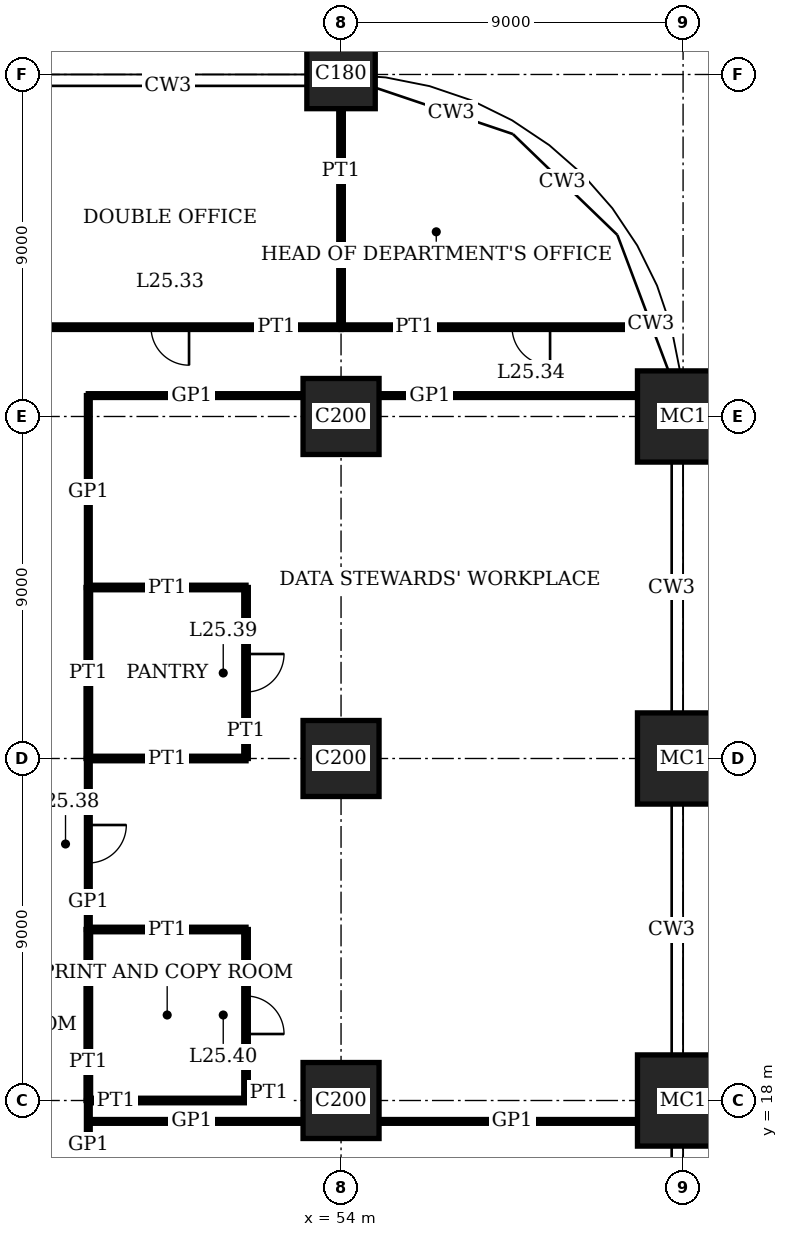
"""IFC4 building model, lengths in metres.
Left out: names, types, materials, properties, quantities, classifications, styles, units other than length and angle.
Written with IfcOpenShell. Run it as: python <this file> out.ifc"""

import sys

from ifc_helpers import new_model, si_unit, direction, frame, frame_2d, origin, origin_2d, place, context, subcontext, project, spatial, rectangle, extrude, element, fill, save


model = new_model("IFC4")
c1 = context("Model", 3, precision=1e-05, world=origin(), true_north=direction((0.0, 1.0)))
c2 = subcontext(c1, "Body", "Model", "MODEL_VIEW")
j1 = project(units=[si_unit("LENGTHUNIT", "METRE"), si_unit("PLANEANGLEUNIT", "RADIAN")], contexts=[c1])
p1 = place(None, origin())
s1 = spatial("IfcSite", under=j1, at=p1, CompositionType="ELEMENT")
p2 = place(p1, origin())
s2 = spatial("IfcBuilding", under=s1, at=p2, CompositionType="ELEMENT")
p3 = place(p2, frame((0.0, 0.0, 105.0)))
s3 = spatial("IfcBuildingStorey", under=s2, at=p3, CompositionType="ELEMENT", Elevation=105.0)
for number, where, z_axis, x_axis in (
    (1, (54.0, 18.0, 0.0), (0.0, 0.0, 1.0), (1.0, 0.0, 0.0)),
    (2, (54.0, 27.0, 0.0), (0.0, 0.0, 1.0), (1.0, 0.0, 0.0)),
    (3, (54.0, 36.0, 0.0), (0.0, 0.0, 1.0), (1.0, 0.0, 0.0)),
):
    element("IfcColumn", number, at=place(p3, frame(where, z_axis=z_axis, x_axis=x_axis)), inside=s3, PredefinedType="COLUMN", context=c2, shape_type="SweptSolid", body=[
        extrude(rectangle(XDim=2.0, YDim=2.0, at=origin_2d()), origin(), (0.0, 0.0, 1.0), 4.0),
    ])
p4 = place(p3, frame((54.0, 45.0, 0.0), z_axis=(0.0, 0.0, 1.0), x_axis=(1.0, 0.0, 0.0)))
e4 = element("IfcColumn", 4, at=p4, inside=s3, PredefinedType="COLUMN", context=c2, shape_type="SweptSolid", body=[
    extrude(rectangle(XDim=1.8, YDim=1.8, at=origin_2d()), origin(), (0.0, 0.0, 1.0), 4.0),
])
for number, where, z_axis, x_axis in (
    (5, (63.0, 18.0, 0.0), (0.0, 0.0, 1.0), (1.0, 0.0, 0.0)),
    (6, (63.0, 27.0, 0.0), (0.0, 0.0, 1.0), (1.0, 0.0, 0.0)),
    (7, (63.0, 36.0, 0.0), (0.0, 0.0, 1.0), (1.0, 0.0, 0.0)),
):
    element("IfcColumn", number, at=place(p3, frame(where, z_axis=z_axis, x_axis=x_axis)), inside=s3, PredefinedType="COLUMN", context=c2, shape_type="SweptSolid", body=[
        extrude(rectangle(XDim=2.4, YDim=2.4, at=origin_2d()), origin(), (0.0, 0.0, 1.0), 4.0),
    ])
p5 = place(p3, frame((47.35, 17.45, 0.0), z_axis=(0.0, 0.0, 1.0), x_axis=(1.0, 0.0, 0.0)))
e8 = element("IfcWall", 8, at=p5, inside=s3, PredefinedType="PARTITIONING", context=c2, shape_type="SweptSolid", body=[
    extrude(rectangle(XDim=5.65, YDim=0.1, at=frame_2d((2.825, 0.0))), origin(), (0.0, 0.0, 1.0), 3.75),
])
p6 = place(p3, frame((55.0, 17.45, 0.0), z_axis=(0.0, 0.0, 1.0), x_axis=(1.0, 0.0, 0.0)))
e9 = element("IfcWall", 9, at=p6, inside=s3, PredefinedType="PARTITIONING", context=c2, shape_type="SweptSolid", body=[
    extrude(rectangle(XDim=6.8, YDim=0.1, at=frame_2d((3.4, 0.0))), origin(), (0.0, 0.0, 1.0), 3.75),
])
p7 = place(p3, frame((47.35, 18.0, 0.0), z_axis=(0.0, 0.0, 1.0), x_axis=(1.0, 0.0, 0.0)))
e10 = element("IfcWall", 10, at=p7, inside=s3, PredefinedType="PARTITIONING", context=c2, shape_type="SweptSolid", body=[
    extrude(rectangle(XDim=4.15, YDim=0.12, at=frame_2d((2.075, 0.0))), origin(), (0.0, 0.0, 1.0), 3.05),
])
p8 = place(p3, frame((47.35, 22.5, 0.0), z_axis=(0.0, 0.0, 1.0), x_axis=(1.0, 0.0, 0.0)))
e11 = element("IfcWall", 11, at=p8, inside=s3, PredefinedType="PARTITIONING", context=c2, shape_type="SweptSolid", body=[
    extrude(rectangle(XDim=4.15, YDim=0.12, at=frame_2d((2.075, 0.0))), origin(), (0.0, 0.0, 1.0), 3.1),
])
p9 = place(p3, frame((47.35, 27.0, 0.0), z_axis=(0.0, 0.0, 1.0), x_axis=(1.0, 0.0, 0.0)))
e12 = element("IfcWall", 12, at=p9, inside=s3, PredefinedType="PARTITIONING", context=c2, shape_type="SweptSolid", body=[
    extrude(rectangle(XDim=4.15, YDim=0.12, at=frame_2d((2.075, 0.0))), origin(), (0.0, 0.0, 1.0), 3.05),
])
p10 = place(p3, frame((47.35, 31.5, 0.0), z_axis=(0.0, 0.0, 1.0), x_axis=(1.0, 0.0, 0.0)))
e13 = element("IfcWall", 13, at=p10, inside=s3, PredefinedType="PARTITIONING", context=c2, shape_type="SweptSolid", body=[
    extrude(rectangle(XDim=4.15, YDim=0.12, at=frame_2d((2.075, 0.0))), origin(), (0.0, 0.0, 1.0), 3.1),
])
p11 = place(p3, frame((47.35, 36.55, 0.0), z_axis=(0.0, 0.0, 1.0), x_axis=(1.0, 0.0, 0.0)))
e14 = element("IfcWall", 14, at=p11, inside=s3, PredefinedType="PARTITIONING", context=c2, shape_type="SweptSolid", body=[
    extrude(rectangle(XDim=5.65, YDim=0.1, at=frame_2d((2.825, 0.0))), origin(), (0.0, 0.0, 1.0), 3.75),
])
p12 = place(p3, frame((55.0, 36.55, 0.0), z_axis=(0.0, 0.0, 1.0), x_axis=(1.0, 0.0, 0.0)))
e15 = element("IfcWall", 15, at=p12, inside=s3, PredefinedType="PARTITIONING", context=c2, shape_type="SweptSolid", body=[
    extrude(rectangle(XDim=6.8, YDim=0.1, at=frame_2d((3.4, 0.0))), origin(), (0.0, 0.0, 1.0), 3.75),
])
p13 = place(p3, frame((45.0, 38.35, 0.0), z_axis=(0.0, 0.0, 1.0), x_axis=(1.0, 0.0, 0.0)))
e16 = element("IfcWall", 16, at=p13, inside=s3, PredefinedType="PARTITIONING", context=c2, shape_type="SweptSolid", body=[
    extrude(rectangle(XDim=9.0, YDim=0.12, at=frame_2d((4.5, 0.0))), origin(), (0.0, 0.0, 1.0), 3.75),
])
p14 = place(p13, frame((4.0, 0.0, 0.0)))
e17 = element("IfcOpeningElement", 17, at=p14, cuts=e16, PredefinedType="OPENING", context=c2, shape_type="SweptSolid", body=[
    extrude(rectangle(XDim=1.0, YDim=2.4, at=frame_2d((0.5, 1.2))), frame((0.0, 0.07, 0.0), z_axis=(0.0, -1.0, 0.0), x_axis=(1.0, 0.0, 0.0)), (0.0, 0.0, 1.0), 0.14),
])
p15 = place(p3, frame((54.0, 38.35, 0.0), z_axis=(0.0, 0.0, 1.0), x_axis=(1.0, 0.0, 0.0)))
e18 = element("IfcWall", 18, at=p15, inside=s3, PredefinedType="PARTITIONING", context=c2, shape_type="SweptSolid", body=[
    extrude(rectangle(XDim=8.145, YDim=0.12, at=frame_2d((4.072, 0.0))), origin(), (0.0, 0.0, 1.0), 3.75),
])
p16 = place(p15, frame((4.5, 0.0, 0.0)))
e19 = element("IfcOpeningElement", 19, at=p16, cuts=e18, PredefinedType="OPENING", context=c2, shape_type="SweptSolid", body=[
    extrude(rectangle(XDim=1.0, YDim=2.4, at=frame_2d((0.5, 1.2))), frame((0.0, 0.07, 0.0), z_axis=(0.0, -1.0, 0.0), x_axis=(1.0, 0.0, 0.0)), (0.0, 0.0, 1.0), 0.14),
])
for number, where, z_axis, x_axis in (
    (20, (47.35, 27.0, 0.0), (0.0, 0.0, 1.0), (0.0, 1.0, 0.0)),
    (21, (47.35, 18.0, 0.0), (0.0, 0.0, 1.0), (0.0, 1.0, 0.0)),
):
    element("IfcWall", number, at=place(p3, frame(where, z_axis=z_axis, x_axis=x_axis)), inside=s3, PredefinedType="PARTITIONING", context=c2, shape_type="SweptSolid", body=[
        extrude(rectangle(XDim=4.5, YDim=0.12, at=frame_2d((2.25, 0.0))), origin(), (0.0, 0.0, 1.0), 3.75),
    ])
p17 = place(p3, frame((47.35, 15.65, 0.0), z_axis=(0.0, 0.0, 1.0), x_axis=(0.0, 1.0, 0.0)))
e22 = element("IfcWall", 22, at=p17, inside=s3, PredefinedType="PARTITIONING", context=c2, shape_type="SweptSolid", body=[
    extrude(rectangle(XDim=2.35, YDim=0.1, at=frame_2d((1.175, 0.0))), origin(), (0.0, 0.0, 1.0), 3.75),
])
p18 = place(p3, frame((47.35, 22.5, 0.0), z_axis=(0.0, 0.0, 1.0), x_axis=(0.0, 1.0, 0.0)))
e23 = element("IfcWall", 23, at=p18, inside=s3, PredefinedType="PARTITIONING", context=c2, shape_type="SweptSolid", body=[
    extrude(rectangle(XDim=4.5, YDim=0.1, at=frame_2d((2.25, 0.0))), origin(), (0.0, 0.0, 1.0), 3.75),
])
p19 = place(p18, frame((1.75, 0.0, 0.0)))
e24 = element("IfcOpeningElement", 24, at=p19, cuts=e23, PredefinedType="OPENING", context=c2, shape_type="SweptSolid", body=[
    extrude(rectangle(XDim=1.0, YDim=2.4, at=frame_2d((0.5, 1.2))), frame((0.0, 0.06, 0.0), z_axis=(0.0, -1.0, 0.0), x_axis=(1.0, 0.0, 0.0)), (0.0, 0.0, 1.0), 0.12),
])
p20 = place(p3, frame((47.35, 31.5, 0.0), z_axis=(0.0, 0.0, 1.0), x_axis=(0.0, 1.0, 0.0)))
e25 = element("IfcWall", 25, at=p20, inside=s3, PredefinedType="PARTITIONING", context=c2, shape_type="SweptSolid", body=[
    extrude(rectangle(XDim=5.05, YDim=0.1, at=frame_2d((2.525, 0.0))), origin(), (0.0, 0.0, 1.0), 3.75),
])
p21 = place(p3, frame((51.5, 27.0, 0.0), z_axis=(0.0, 0.0, 1.0), x_axis=(0.0, 1.0, 0.0)))
e26 = element("IfcWall", 26, at=p21, inside=s3, PredefinedType="PARTITIONING", context=c2, shape_type="SweptSolid", body=[
    extrude(rectangle(XDim=4.5, YDim=0.12, at=frame_2d((2.25, 0.0))), origin(), (0.0, 0.0, 1.0), 3.75),
])
p22 = place(p21, frame((1.75, 0.0, 0.0)))
e27 = element("IfcOpeningElement", 27, at=p22, cuts=e26, PredefinedType="OPENING", context=c2, shape_type="SweptSolid", body=[
    extrude(rectangle(XDim=1.0, YDim=2.4, at=frame_2d((0.5, 1.2))), frame((0.0, 0.07, 0.0), z_axis=(0.0, -1.0, 0.0), x_axis=(1.0, 0.0, 0.0)), (0.0, 0.0, 1.0), 0.14),
])
p23 = place(p3, frame((51.5, 18.0, 0.0), z_axis=(0.0, 0.0, 1.0), x_axis=(0.0, 1.0, 0.0)))
e28 = element("IfcWall", 28, at=p23, inside=s3, PredefinedType="PARTITIONING", context=c2, shape_type="SweptSolid", body=[
    extrude(rectangle(XDim=4.5, YDim=0.12, at=frame_2d((2.25, 0.0))), origin(), (0.0, 0.0, 1.0), 3.75),
])
p24 = place(p23, frame((1.75, 0.0, 0.0)))
e29 = element("IfcOpeningElement", 29, at=p24, cuts=e28, PredefinedType="OPENING", context=c2, shape_type="SweptSolid", body=[
    extrude(rectangle(XDim=1.0, YDim=2.4, at=frame_2d((0.5, 1.2))), frame((0.0, 0.07, 0.0), z_axis=(0.0, -1.0, 0.0), x_axis=(1.0, 0.0, 0.0)), (0.0, 0.0, 1.0), 0.14),
])
p25 = place(p3, frame((54.0, 38.35, 0.0), z_axis=(0.0, 0.0, 1.0), x_axis=(0.0, 1.0, 0.0)))
e30 = element("IfcWall", 30, at=p25, inside=s3, PredefinedType="PARTITIONING", context=c2, shape_type="SweptSolid", body=[
    extrude(rectangle(XDim=5.75, YDim=0.12, at=frame_2d((2.875, 0.0))), origin(), (0.0, 0.0, 1.0), 3.05),
])
p26 = place(p14, origin())
e31 = element("IfcDoor", 31, at=p26, inside=s3, OperationType="SINGLE_SWING_RIGHT", PredefinedType="DOOR", context=c2, shape_type="SweptSolid", body=[
    extrude(rectangle(XDim=1.0, YDim=2.4, at=frame_2d((0.5, 1.2))), frame((0.0, 0.025, 0.0), z_axis=(0.0, -1.0, 0.0), x_axis=(1.0, 0.0, 0.0)), (0.0, 0.0, 1.0), 0.05),
])
fill(e17, e31)
p27 = place(p16, origin())
e32 = element("IfcDoor", 32, at=p27, inside=s3, OperationType="SINGLE_SWING_RIGHT", PredefinedType="DOOR", context=c2, shape_type="SweptSolid", body=[
    extrude(rectangle(XDim=1.0, YDim=2.4, at=frame_2d((0.5, 1.2))), frame((0.0, 0.025, 0.0), z_axis=(0.0, -1.0, 0.0), x_axis=(1.0, 0.0, 0.0)), (0.0, 0.0, 1.0), 0.05),
])
fill(e19, e32)
p28 = place(p19, origin())
e33 = element("IfcDoor", 33, at=p28, inside=s3, OperationType="SINGLE_SWING_RIGHT", PredefinedType="DOOR", context=c2, shape_type="SweptSolid", body=[
    extrude(rectangle(XDim=1.0, YDim=2.4, at=frame_2d((0.5, 1.2))), frame((0.0, 0.02, 0.0), z_axis=(0.0, -1.0, 0.0), x_axis=(1.0, 0.0, 0.0)), (0.0, 0.0, 1.0), 0.04),
])
fill(e24, e33)
p29 = place(p22, origin())
e34 = element("IfcDoor", 34, at=p29, inside=s3, OperationType="SINGLE_SWING_RIGHT", PredefinedType="DOOR", context=c2, shape_type="SweptSolid", body=[
    extrude(rectangle(XDim=1.0, YDim=2.4, at=frame_2d((0.5, 1.2))), frame((0.0, 0.025, 0.0), z_axis=(0.0, -1.0, 0.0), x_axis=(1.0, 0.0, 0.0)), (0.0, 0.0, 1.0), 0.05),
])
fill(e27, e34)
p30 = place(p24, origin())
e35 = element("IfcDoor", 35, at=p30, inside=s3, OperationType="SINGLE_SWING_LEFT", PredefinedType="DOOR", context=c2, shape_type="SweptSolid", body=[
    extrude(rectangle(XDim=1.0, YDim=2.4, at=frame_2d((0.5, 1.2))), frame((0.0, 0.025, 0.0), z_axis=(0.0, -1.0, 0.0), x_axis=(1.0, 0.0, 0.0)), (0.0, 0.0, 1.0), 0.05),
])
fill(e29, e35)
save(model, sys.argv[1])
